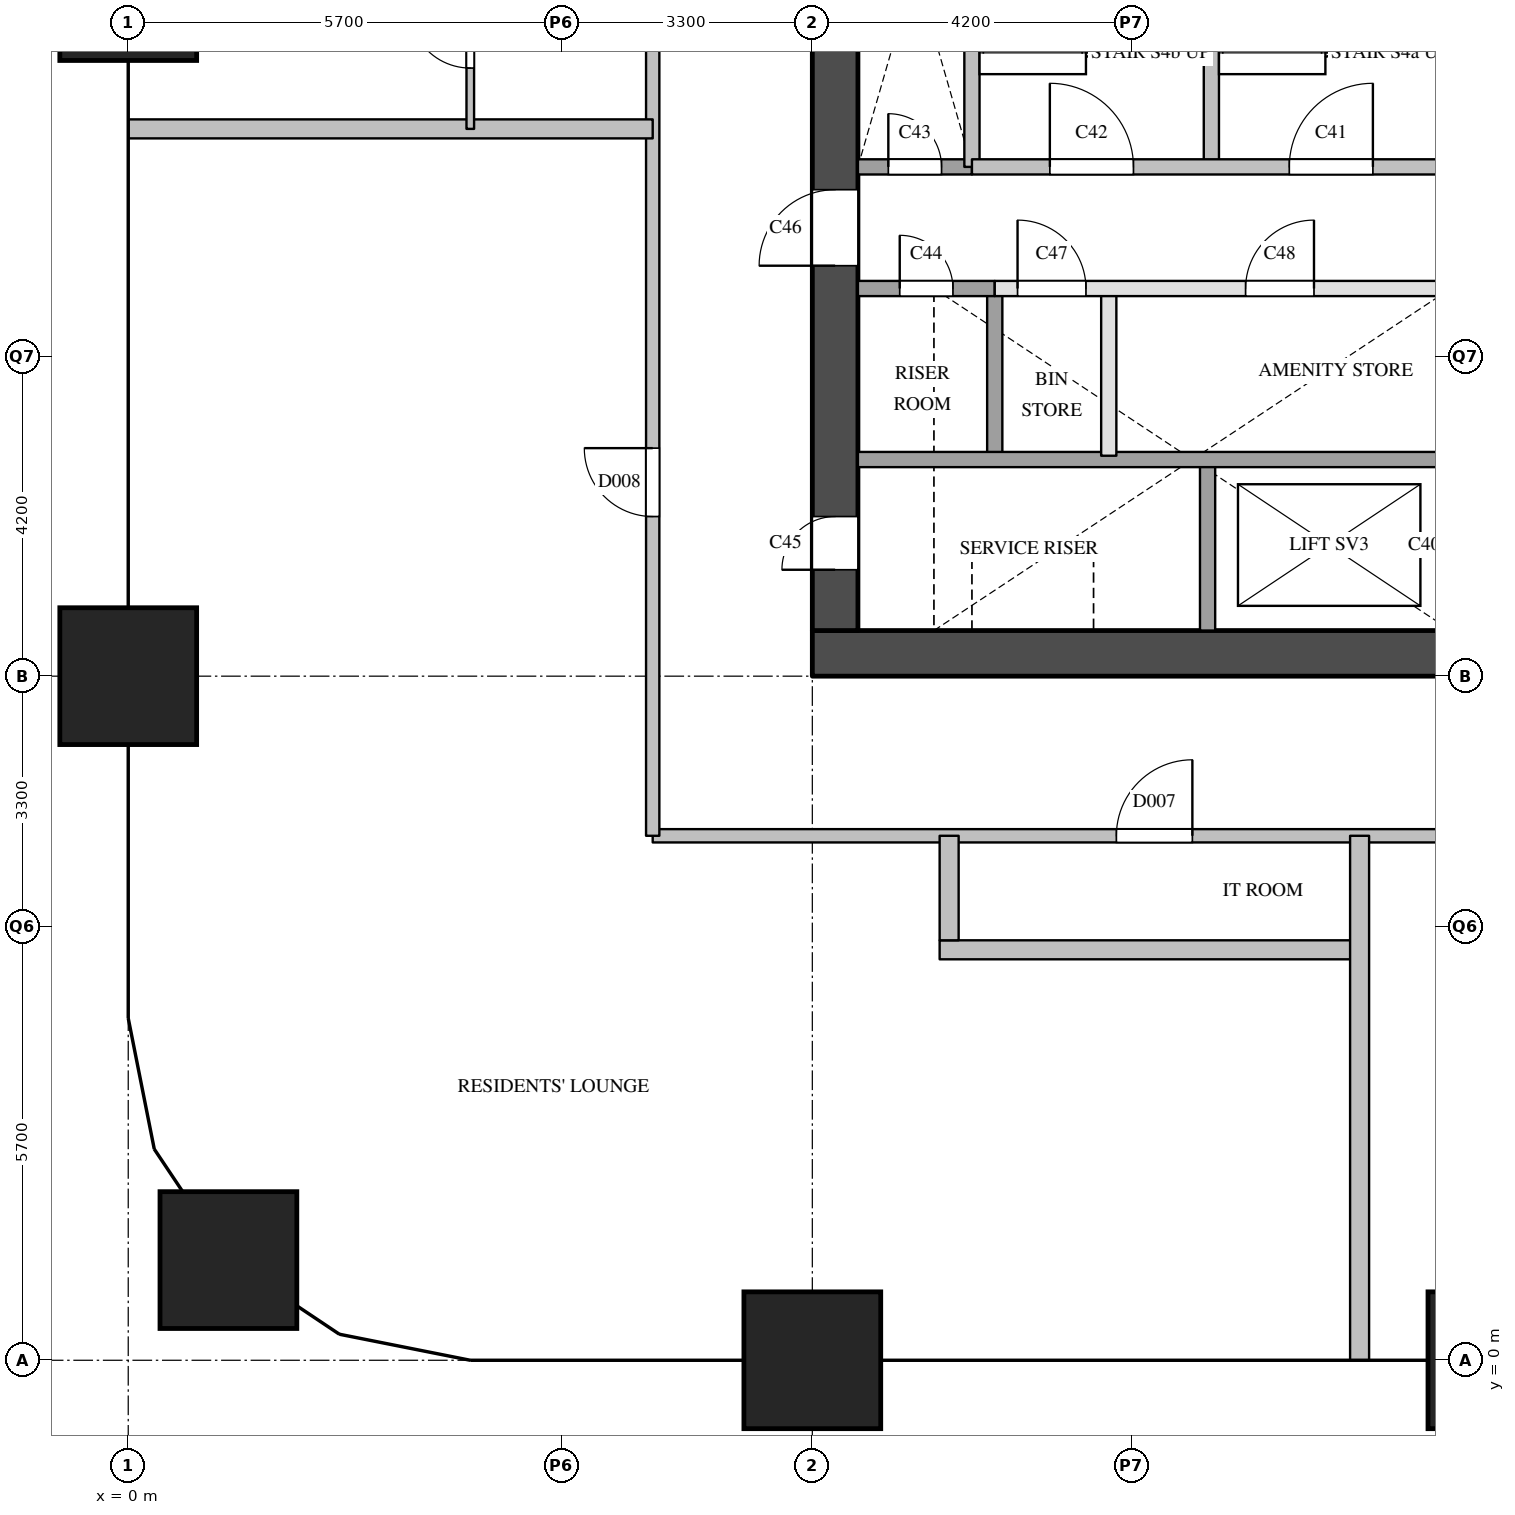
"""IFC4 building model, lengths in metres.
Left out: names, types, materials, properties, quantities, classifications, styles, units other than length and angle.
Written with IfcOpenShell. Run it as: python <this file> out.ifc"""

import sys

from ifc_helpers import new_model, si_unit, direction, frame, frame_2d, origin, origin_2d, place, context, subcontext, project, spatial, rectangle, extrude, element, fill, save


model = new_model("IFC4")
c1 = context("Model", 3, precision=1e-05, world=origin(), true_north=direction((0.0, 1.0)))
c2 = subcontext(c1, "Body", "Model", "MODEL_VIEW")
j1 = project(units=[si_unit("LENGTHUNIT", "METRE"), si_unit("PLANEANGLEUNIT", "RADIAN")], contexts=[c1])
p1 = place(None, origin())
s1 = spatial("IfcSite", under=j1, at=p1, CompositionType="ELEMENT")
p2 = place(p1, origin())
s2 = spatial("IfcBuilding", under=s1, at=p2, CompositionType="ELEMENT")
p3 = place(p2, frame((0.0, 0.0, 53.8)))
s3 = spatial("IfcBuildingStorey", under=s2, at=p3, CompositionType="ELEMENT", Elevation=53.8)
for number, where, z_axis, x_axis in (
    (1, (1.318, 1.318, 0.0), (0.0, 0.0, 1.0), (1.0, 0.0, 0.0)),
    (2, (0.0, 9.0, 0.0), (0.0, 0.0, 1.0), (1.0, 0.0, 0.0)),
    (3, (0.0, 18.0, 0.0), (0.0, 0.0, 1.0), (1.0, 0.0, 0.0)),
    (4, (9.0, 0.0, 0.0), (0.0, 0.0, 1.0), (1.0, 0.0, 0.0)),
    (5, (18.0, 0.0, 0.0), (0.0, 0.0, 1.0), (1.0, 0.0, 0.0)),
):
    element("IfcColumn", number, at=place(p3, frame(where, z_axis=z_axis, x_axis=x_axis)), inside=s3, PredefinedType="COLUMN", context=c2, shape_type="SweptSolid", body=[
        extrude(rectangle(XDim=1.8, YDim=1.8, at=origin_2d()), origin(), (0.0, 0.0, 1.0), 3.8),
    ])
p4 = place(p3, frame((9.0, 9.3, 0.0), z_axis=(0.0, 0.0, 1.0), x_axis=(1.0, 0.0, 0.0)))
e6 = element("IfcWall", 6, at=p4, inside=s3, PredefinedType="SHEAR", context=c2, shape_type="SweptSolid", body=[
    extrude(rectangle(XDim=9.0, YDim=0.6, at=frame_2d((4.5, 0.0))), origin(), (0.0, 0.0, 1.0), 3.5),
])
p5 = place(p3, frame((9.3, 9.6, 0.0), z_axis=(0.0, 0.0, 1.0), x_axis=(0.0, 1.0, 0.0)))
e7 = element("IfcWall", 7, at=p5, inside=s3, PredefinedType="SHEAR", context=c2, shape_type="SweptSolid", body=[
    extrude(rectangle(XDim=12.3, YDim=0.6, at=frame_2d((6.15, 0.0))), origin(), (0.0, 0.0, 1.0), 3.5),
])
p6 = place(p5, frame((0.8, 0.0, 0.0)))
e8 = element("IfcOpeningElement", 8, at=p6, cuts=e7, PredefinedType="OPENING", context=c2, shape_type="SweptSolid", body=[
    extrude(rectangle(XDim=0.7, YDim=2.1, at=frame_2d((0.35, 1.05))), frame((0.0, 0.31, 0.0), z_axis=(0.0, -1.0, 0.0), x_axis=(1.0, 0.0, 0.0)), (0.0, 0.0, 1.0), 0.62),
])
p7 = place(p5, frame((4.8, 0.0, 0.0)))
e9 = element("IfcOpeningElement", 9, at=p7, cuts=e7, PredefinedType="OPENING", context=c2, shape_type="SweptSolid", body=[
    extrude(rectangle(XDim=1.0, YDim=2.1, at=frame_2d((0.5, 1.05))), frame((0.0, 0.31, 0.0), z_axis=(0.0, -1.0, 0.0), x_axis=(1.0, 0.0, 0.0)), (0.0, 0.0, 1.0), 0.62),
])
p8 = place(p3, frame((11.1, 15.7, 0.0), z_axis=(0.0, 0.0, 1.0), x_axis=(0.0, 1.0, 0.0)))
e10 = element("IfcWall", 10, at=p8, inside=s3, PredefinedType="SOLIDWALL", context=c2, shape_type="SweptSolid", body=[
    extrude(rectangle(XDim=4.3, YDim=0.2, at=frame_2d((2.15, 0.0))), origin(), (0.0, 0.0, 1.0), 3.5),
])
p9 = place(p3, frame((11.4, 11.9, 0.0), z_axis=(0.0, 0.0, 1.0), x_axis=(0.0, 1.0, 0.0)))
e11 = element("IfcWall", 11, at=p9, inside=s3, PredefinedType="SOLIDWALL", context=c2, shape_type="SweptSolid", body=[
    extrude(rectangle(XDim=2.2, YDim=0.2, at=frame_2d((1.1, 0.0))), origin(), (0.0, 0.0, 1.0), 3.5),
])
p10 = place(p3, frame((12.9, 11.9, 0.0), z_axis=(0.0, 0.0, 1.0), x_axis=(0.0, 1.0, 0.0)))
e12 = element("IfcWall", 12, at=p10, inside=s3, PredefinedType="PARTITIONING", context=c2, shape_type="SweptSolid", body=[
    extrude(rectangle(XDim=2.2, YDim=0.2, at=frame_2d((1.1, 0.0))), origin(), (0.0, 0.0, 1.0), 3.5),
])
p11 = place(p3, frame((14.2, 9.6, 0.0), z_axis=(0.0, 0.0, 1.0), x_axis=(0.0, 1.0, 0.0)))
e13 = element("IfcWall", 13, at=p11, inside=s3, PredefinedType="SOLIDWALL", context=c2, shape_type="SweptSolid", body=[
    extrude(rectangle(XDim=2.3, YDim=0.2, at=frame_2d((1.15, 0.0))), origin(), (0.0, 0.0, 1.0), 3.5),
])
p12 = place(p3, frame((14.25, 15.7, 0.0), z_axis=(0.0, 0.0, 1.0), x_axis=(0.0, 1.0, 0.0)))
e14 = element("IfcWall", 14, at=p12, inside=s3, PredefinedType="SOLIDWALL", context=c2, shape_type="SweptSolid", body=[
    extrude(rectangle(XDim=4.3, YDim=0.2, at=frame_2d((2.15, 0.0))), origin(), (0.0, 0.0, 1.0), 3.5),
])
p13 = place(p3, frame((9.6, 11.85, 0.0), z_axis=(0.0, 0.0, 1.0), x_axis=(1.0, 0.0, 0.0)))
e15 = element("IfcWall", 15, at=p13, inside=s3, PredefinedType="SOLIDWALL", context=c2, shape_type="SweptSolid", body=[
    extrude(rectangle(XDim=7.8, YDim=0.2, at=frame_2d((3.9, 0.0))), origin(), (0.0, 0.0, 1.0), 3.5),
])
p14 = place(p3, frame((11.4, 14.1, 0.0), z_axis=(0.0, 0.0, 1.0), x_axis=(1.0, 0.0, 0.0)))
e16 = element("IfcWall", 16, at=p14, inside=s3, PredefinedType="PARTITIONING", context=c2, shape_type="SweptSolid", body=[
    extrude(rectangle(XDim=6.0, YDim=0.2, at=frame_2d((3.0, 0.0))), origin(), (0.0, 0.0, 1.0), 3.5),
])
p15 = place(p14, frame((0.3, 0.0, 0.0)))
e17 = element("IfcOpeningElement", 17, at=p15, cuts=e16, PredefinedType="OPENING", context=c2, shape_type="SweptSolid", body=[
    extrude(rectangle(XDim=0.9, YDim=2.1, at=frame_2d((0.45, 1.05))), frame((0.0, 0.11, 0.0), z_axis=(0.0, -1.0, 0.0), x_axis=(1.0, 0.0, 0.0)), (0.0, 0.0, 1.0), 0.22),
])
p16 = place(p14, frame((3.3, 0.0, 0.0)))
e18 = element("IfcOpeningElement", 18, at=p16, cuts=e16, PredefinedType="OPENING", context=c2, shape_type="SweptSolid", body=[
    extrude(rectangle(XDim=0.9, YDim=2.1, at=frame_2d((0.45, 1.05))), frame((0.0, 0.11, 0.0), z_axis=(0.0, -1.0, 0.0), x_axis=(1.0, 0.0, 0.0)), (0.0, 0.0, 1.0), 0.22),
])
p17 = place(p3, frame((9.6, 14.1, 0.0), z_axis=(0.0, 0.0, 1.0), x_axis=(1.0, 0.0, 0.0)))
e19 = element("IfcWall", 19, at=p17, inside=s3, PredefinedType="SOLIDWALL", context=c2, shape_type="SweptSolid", body=[
    extrude(rectangle(XDim=1.8, YDim=0.2, at=frame_2d((0.9, 0.0))), origin(), (0.0, 0.0, 1.0), 3.5),
])
p18 = place(p17, frame((0.55, 0.0, 0.0)))
e20 = element("IfcOpeningElement", 20, at=p18, cuts=e19, PredefinedType="OPENING", context=c2, shape_type="SweptSolid", body=[
    extrude(rectangle(XDim=0.7, YDim=2.1, at=frame_2d((0.35, 1.05))), frame((0.0, 0.11, 0.0), z_axis=(0.0, -1.0, 0.0), x_axis=(1.0, 0.0, 0.0)), (0.0, 0.0, 1.0), 0.22),
])
p19 = place(p3, frame((9.6, 15.7, 0.0), z_axis=(0.0, 0.0, 1.0), x_axis=(1.0, 0.0, 0.0)))
e21 = element("IfcWall", 21, at=p19, inside=s3, PredefinedType="SOLIDWALL", context=c2, shape_type="SweptSolid", body=[
    extrude(rectangle(XDim=1.5, YDim=0.2, at=frame_2d((0.75, 0.0))), origin(), (0.0, 0.0, 1.0), 3.5),
])
p20 = place(p19, frame((0.4, 0.0, 0.0)))
e22 = element("IfcOpeningElement", 22, at=p20, cuts=e21, PredefinedType="OPENING", context=c2, shape_type="SweptSolid", body=[
    extrude(rectangle(XDim=0.7, YDim=2.1, at=frame_2d((0.35, 1.05))), frame((0.0, 0.11, 0.0), z_axis=(0.0, -1.0, 0.0), x_axis=(1.0, 0.0, 0.0)), (0.0, 0.0, 1.0), 0.22),
])
p21 = place(p3, frame((11.1, 15.7, 0.0), z_axis=(0.0, 0.0, 1.0), x_axis=(1.0, 0.0, 0.0)))
e23 = element("IfcWall", 23, at=p21, inside=s3, PredefinedType="SOLIDWALL", context=c2, shape_type="SweptSolid", body=[
    extrude(rectangle(XDim=6.3, YDim=0.2, at=frame_2d((3.15, 0.0))), origin(), (0.0, 0.0, 1.0), 3.5),
])
p22 = place(p21, frame((4.175, 0.0, 0.0)))
e24 = element("IfcOpeningElement", 24, at=p22, cuts=e23, PredefinedType="OPENING", context=c2, shape_type="SweptSolid", body=[
    extrude(rectangle(XDim=1.1, YDim=2.1, at=frame_2d((0.55, 1.05))), frame((0.0, 0.11, 0.0), z_axis=(0.0, -1.0, 0.0), x_axis=(1.0, 0.0, 0.0)), (0.0, 0.0, 1.0), 0.22),
])
p23 = place(p21, frame((1.025, 0.0, 0.0)))
e25 = element("IfcOpeningElement", 25, at=p23, cuts=e23, PredefinedType="OPENING", context=c2, shape_type="SweptSolid", body=[
    extrude(rectangle(XDim=1.1, YDim=2.1, at=frame_2d((0.55, 1.05))), frame((0.0, 0.11, 0.0), z_axis=(0.0, -1.0, 0.0), x_axis=(1.0, 0.0, 0.0)), (0.0, 0.0, 1.0), 0.22),
])
p24 = place(p3, frame((6.9, 6.9, 0.0), z_axis=(0.0, 0.0, 1.0), x_axis=(1.0, 0.0, 0.0)))
e26 = element("IfcWall", 26, at=p24, inside=s3, PredefinedType="PARTITIONING", context=c2, shape_type="SweptSolid", body=[
    extrude(rectangle(XDim=13.2, YDim=0.175, at=frame_2d((6.6, 0.0))), origin(), (0.0, 0.0, 1.0), 3.5),
])
p25 = place(p24, frame((6.1, 0.0, 0.0)))
e27 = element("IfcOpeningElement", 27, at=p25, cuts=e26, PredefinedType="OPENING", context=c2, shape_type="SweptSolid", body=[
    extrude(rectangle(XDim=1.0, YDim=2.1, at=frame_2d((0.5, 1.05))), frame((0.0, 0.097, 0.0), z_axis=(0.0, -1.0, 0.0), x_axis=(1.0, 0.0, 0.0)), (0.0, 0.0, 1.0), 0.195),
])
p26 = place(p3, frame((6.9, 6.9, 0.0), z_axis=(0.0, 0.0, 1.0), x_axis=(0.0, 1.0, 0.0)))
e28 = element("IfcWall", 28, at=p26, inside=s3, PredefinedType="PARTITIONING", context=c2, shape_type="SweptSolid", body=[
    extrude(rectangle(XDim=17.09, YDim=0.175, at=frame_2d((8.545, 0.0))), origin(), (0.0, 0.0, 1.0), 3.5),
])
p27 = place(p26, frame((4.2, 0.0, 0.0)))
e29 = element("IfcOpeningElement", 29, at=p27, cuts=e28, PredefinedType="OPENING", context=c2, shape_type="SweptSolid", body=[
    extrude(rectangle(XDim=0.9, YDim=2.1, at=frame_2d((0.45, 1.05))), frame((0.0, 0.097, 0.0), z_axis=(0.0, -1.0, 0.0), x_axis=(1.0, 0.0, 0.0)), (0.0, 0.0, 1.0), 0.195),
])
p28 = place(p26, frame((13.895, 0.0, 0.0)))
e30 = element("IfcOpeningElement", 30, at=p28, cuts=e28, PredefinedType="OPENING", context=c2, shape_type="SweptSolid", body=[
    extrude(rectangle(XDim=1.0, YDim=2.1, at=frame_2d((0.5, 1.05))), frame((0.0, 0.097, 0.0), z_axis=(0.0, -1.0, 0.0), x_axis=(1.0, 0.0, 0.0)), (0.0, 0.0, 1.0), 0.195),
])
p29 = place(p3, frame((10.675, 5.4, 0.0), z_axis=(0.0, 0.0, 1.0), x_axis=(1.0, 0.0, 0.0)))
e31 = element("IfcWall", 31, at=p29, inside=s3, PredefinedType="PARTITIONING", context=c2, shape_type="SweptSolid", body=[
    extrude(rectangle(XDim=5.525, YDim=0.25, at=frame_2d((2.762, 0.0))), origin(), (0.0, 0.0, 1.0), 3.5),
])
p30 = place(p3, frame((0.0, 16.2, 0.0), z_axis=(0.0, 0.0, 1.0), x_axis=(1.0, 0.0, 0.0)))
e32 = element("IfcWall", 32, at=p30, inside=s3, PredefinedType="PARTITIONING", context=c2, shape_type="SweptSolid", body=[
    extrude(rectangle(XDim=6.9, YDim=0.25, at=frame_2d((3.45, 0.0))), origin(), (0.0, 0.0, 1.0), 2.5),
])
p31 = place(p3, frame((10.8, 5.525, 0.0), z_axis=(0.0, 0.0, 1.0), x_axis=(0.0, 1.0, 0.0)))
e33 = element("IfcWall", 33, at=p31, inside=s3, PredefinedType="PARTITIONING", context=c2, shape_type="SweptSolid", body=[
    extrude(rectangle(XDim=1.375, YDim=0.25, at=frame_2d((0.688, 0.0))), origin(), (0.0, 0.0, 1.0), 3.5),
])
p32 = place(p3, frame((16.2, 0.0, 0.0), z_axis=(0.0, 0.0, 1.0), x_axis=(0.0, 1.0, 0.0)))
e34 = element("IfcWall", 34, at=p32, inside=s3, PredefinedType="PARTITIONING", context=c2, shape_type="SweptSolid", body=[
    extrude(rectangle(XDim=6.9, YDim=0.25, at=frame_2d((3.45, 0.0))), origin(), (0.0, 0.0, 1.0), 2.5),
])
p33 = place(p3, frame((4.5, 16.2, 0.0), z_axis=(0.0, 0.0, 1.0), x_axis=(0.0, 1.0, 0.0)))
e35 = element("IfcWall", 35, at=p33, inside=s3, PredefinedType="PARTITIONING", context=c2, shape_type="SweptSolid", body=[
    extrude(rectangle(XDim=2.4, YDim=0.1, at=frame_2d((1.2, 0.0))), origin(), (0.0, 0.0, 1.0), 3.5),
])
p34 = place(p33, frame((0.8, 0.0, 0.0)))
e36 = element("IfcOpeningElement", 36, at=p34, cuts=e35, PredefinedType="OPENING", context=c2, shape_type="SweptSolid", body=[
    extrude(rectangle(XDim=0.8, YDim=2.1, at=frame_2d((0.4, 1.05))), frame((0.0, 0.06, 0.0), z_axis=(0.0, -1.0, 0.0), x_axis=(1.0, 0.0, 0.0)), (0.0, 0.0, 1.0), 0.12),
])
p35 = place(p22, origin())
e37 = element("IfcDoor", 37, at=p35, inside=s3, OperationType="SINGLE_SWING_RIGHT", PredefinedType="DOOR", context=c2, shape_type="SweptSolid", body=[
    extrude(rectangle(XDim=1.1, YDim=2.1, at=frame_2d((0.55, 1.05))), frame((0.0, 0.025, 0.0), z_axis=(0.0, -1.0, 0.0), x_axis=(1.0, 0.0, 0.0)), (0.0, 0.0, 1.0), 0.05),
])
fill(e24, e37)
p36 = place(p23, origin())
e38 = element("IfcDoor", 38, at=p36, inside=s3, OperationType="SINGLE_SWING_LEFT", PredefinedType="DOOR", context=c2, shape_type="SweptSolid", body=[
    extrude(rectangle(XDim=1.1, YDim=2.1, at=frame_2d((0.55, 1.05))), frame((0.0, 0.025, 0.0), z_axis=(0.0, -1.0, 0.0), x_axis=(1.0, 0.0, 0.0)), (0.0, 0.0, 1.0), 0.05),
])
fill(e25, e38)
p37 = place(p20, origin())
e39 = element("IfcDoor", 39, at=p37, inside=s3, OperationType="SINGLE_SWING_LEFT", PredefinedType="DOOR", context=c2, shape_type="SweptSolid", body=[
    extrude(rectangle(XDim=0.7, YDim=2.1, at=frame_2d((0.35, 1.05))), frame((0.0, 0.025, 0.0), z_axis=(0.0, -1.0, 0.0), x_axis=(1.0, 0.0, 0.0)), (0.0, 0.0, 1.0), 0.05),
])
fill(e22, e39)
p38 = place(p18, origin())
e40 = element("IfcDoor", 40, at=p38, inside=s3, OperationType="SINGLE_SWING_LEFT", PredefinedType="DOOR", context=c2, shape_type="SweptSolid", body=[
    extrude(rectangle(XDim=0.7, YDim=2.1, at=frame_2d((0.35, 1.05))), frame((0.0, 0.025, 0.0), z_axis=(0.0, -1.0, 0.0), x_axis=(1.0, 0.0, 0.0)), (0.0, 0.0, 1.0), 0.05),
])
fill(e20, e40)
p39 = place(p6, origin())
e41 = element("IfcDoor", 41, at=p39, inside=s3, OperationType="SINGLE_SWING_LEFT", PredefinedType="DOOR", context=c2, shape_type="SweptSolid", body=[
    extrude(rectangle(XDim=0.7, YDim=2.1, at=frame_2d((0.35, 1.05))), frame((0.0, 0.025, 0.0), z_axis=(0.0, -1.0, 0.0), x_axis=(1.0, 0.0, 0.0)), (0.0, 0.0, 1.0), 0.05),
])
fill(e8, e41)
p40 = place(p7, origin())
e42 = element("IfcDoor", 42, at=p40, inside=s3, OperationType="SINGLE_SWING_LEFT", PredefinedType="DOOR", context=c2, shape_type="SweptSolid", body=[
    extrude(rectangle(XDim=1.0, YDim=2.1, at=frame_2d((0.5, 1.05))), frame((0.0, 0.025, 0.0), z_axis=(0.0, -1.0, 0.0), x_axis=(1.0, 0.0, 0.0)), (0.0, 0.0, 1.0), 0.05),
])
fill(e9, e42)
p41 = place(p15, origin())
e43 = element("IfcDoor", 43, at=p41, inside=s3, OperationType="SINGLE_SWING_LEFT", PredefinedType="DOOR", context=c2, shape_type="SweptSolid", body=[
    extrude(rectangle(XDim=0.9, YDim=2.1, at=frame_2d((0.45, 1.05))), frame((0.0, 0.025, 0.0), z_axis=(0.0, -1.0, 0.0), x_axis=(1.0, 0.0, 0.0)), (0.0, 0.0, 1.0), 0.05),
])
fill(e17, e43)
p42 = place(p16, origin())
e44 = element("IfcDoor", 44, at=p42, inside=s3, OperationType="SINGLE_SWING_RIGHT", PredefinedType="DOOR", context=c2, shape_type="SweptSolid", body=[
    extrude(rectangle(XDim=0.9, YDim=2.1, at=frame_2d((0.45, 1.05))), frame((0.0, 0.025, 0.0), z_axis=(0.0, -1.0, 0.0), x_axis=(1.0, 0.0, 0.0)), (0.0, 0.0, 1.0), 0.05),
])
fill(e18, e44)
p43 = place(p25, origin())
e45 = element("IfcDoor", 45, at=p43, inside=s3, OperationType="SINGLE_SWING_RIGHT", PredefinedType="DOOR", context=c2, shape_type="SweptSolid", body=[
    extrude(rectangle(XDim=1.0, YDim=2.1, at=frame_2d((0.5, 1.05))), frame((0.0, 0.025, 0.0), z_axis=(0.0, -1.0, 0.0), x_axis=(1.0, 0.0, 0.0)), (0.0, 0.0, 1.0), 0.05),
])
fill(e27, e45)
p44 = place(p27, origin())
e46 = element("IfcDoor", 46, at=p44, inside=s3, OperationType="SINGLE_SWING_RIGHT", PredefinedType="DOOR", context=c2, shape_type="SweptSolid", body=[
    extrude(rectangle(XDim=0.9, YDim=2.1, at=frame_2d((0.45, 1.05))), frame((0.0, 0.025, 0.0), z_axis=(0.0, -1.0, 0.0), x_axis=(1.0, 0.0, 0.0)), (0.0, 0.0, 1.0), 0.05),
])
fill(e29, e46)
p45 = place(p34, origin())
e47 = element("IfcDoor", 47, at=p45, inside=s3, OperationType="SINGLE_SWING_RIGHT", PredefinedType="DOOR", context=c2, shape_type="SweptSolid", body=[
    extrude(rectangle(XDim=0.8, YDim=2.1, at=frame_2d((0.4, 1.05))), frame((0.0, 0.025, 0.0), z_axis=(0.0, -1.0, 0.0), x_axis=(1.0, 0.0, 0.0)), (0.0, 0.0, 1.0), 0.05),
])
fill(e36, e47)
save(model, sys.argv[1])
